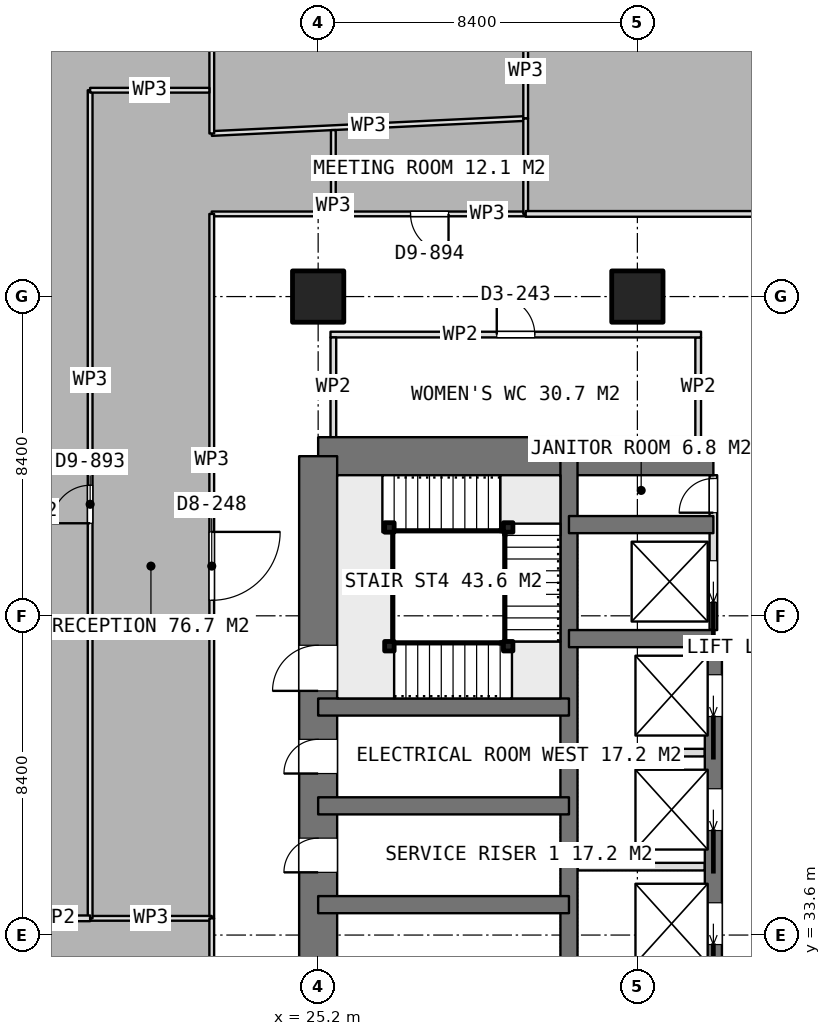
"""IFC4 building model, lengths in metres.
Left out: names, types, materials, properties, quantities, classifications, styles, units other than length and angle.
Written with IfcOpenShell. Run it as: python <this file> out.ifc"""

import sys

from ifc_helpers import new_model, si_unit, direction, frame, frame_2d, origin, origin_2d, place, context, subcontext, project, spatial, rectangle, extrude, element, fill, save


model = new_model("IFC4")
c1 = context("Model", 3, precision=1e-05, world=origin(), true_north=direction((0.0, 1.0)))
c2 = subcontext(c1, "Body", "Model", "MODEL_VIEW")
j1 = project(units=[si_unit("LENGTHUNIT", "METRE"), si_unit("PLANEANGLEUNIT", "RADIAN")], contexts=[c1])
p1 = place(None, origin())
s1 = spatial("IfcSite", under=j1, at=p1, CompositionType="ELEMENT")
p2 = place(p1, origin())
s2 = spatial("IfcBuilding", under=s1, at=p2, CompositionType="ELEMENT")
p3 = place(p2, frame((0.0, 0.0, 225.2)))
s3 = spatial("IfcBuildingStorey", under=s2, at=p3, CompositionType="ELEMENT", Elevation=225.2)
p4 = place(p3, frame((25.2, 46.2, 0.0), z_axis=(0.0, 0.0, 1.0), x_axis=(1.0, 0.0, 0.0)))
e1 = element("IfcWall", 1, at=p4, inside=s3, PredefinedType="SHEAR", context=c2, shape_type="SweptSolid", body=[
    extrude(rectangle(XDim=10.4, YDim=1.0, at=frame_2d((5.2, 0.0))), origin(), (0.0, 0.0, 1.0), 3.75),
])
p5 = place(p3, frame((25.2, 21.0, 0.0), z_axis=(0.0, 0.0, 1.0), x_axis=(0.0, 1.0, 0.0)))
e2 = element("IfcWall", 2, at=p5, inside=s3, PredefinedType="SHEAR", context=c2, shape_type="SweptSolid", body=[
    extrude(rectangle(XDim=25.2, YDim=1.0, at=frame_2d((12.6, 0.0))), origin(), (0.0, 0.0, 1.0), 3.75),
])
p6 = place(p5, frame((7.8, 0.0, 0.0)))
e3 = element("IfcOpeningElement", 3, at=p6, cuts=e2, PredefinedType="OPENING", context=c2, shape_type="SweptSolid", body=[
    extrude(rectangle(XDim=1.2, YDim=2.1, at=frame_2d((0.6, 1.05))), frame((0.0, 0.51, 0.0), z_axis=(0.0, -1.0, 0.0), x_axis=(1.0, 0.0, 0.0)), (0.0, 0.0, 1.0), 1.02),
])
p7 = place(p5, frame((14.25, 0.0, 0.0)))
e4 = element("IfcOpeningElement", 4, at=p7, cuts=e2, PredefinedType="OPENING", context=c2, shape_type="SweptSolid", body=[
    extrude(rectangle(XDim=0.9, YDim=2.1, at=frame_2d((0.45, 1.05))), frame((0.0, 0.51, 0.0), z_axis=(0.0, -1.0, 0.0), x_axis=(1.0, 0.0, 0.0)), (0.0, 0.0, 1.0), 1.02),
])
p8 = place(p5, frame((16.85, 0.0, 0.0)))
e5 = element("IfcOpeningElement", 5, at=p8, cuts=e2, PredefinedType="OPENING", context=c2, shape_type="SweptSolid", body=[
    extrude(rectangle(XDim=0.9, YDim=2.1, at=frame_2d((0.45, 1.05))), frame((0.0, 0.51, 0.0), z_axis=(0.0, -1.0, 0.0), x_axis=(1.0, 0.0, 0.0)), (0.0, 0.0, 1.0), 1.02),
])
p9 = place(p5, frame((19.025, 0.0, 0.0)))
e6 = element("IfcOpeningElement", 6, at=p9, cuts=e2, PredefinedType="OPENING", context=c2, shape_type="SweptSolid", body=[
    extrude(rectangle(XDim=1.2, YDim=2.1, at=frame_2d((0.6, 1.05))), frame((0.0, 0.51, 0.0), z_axis=(0.0, -1.0, 0.0), x_axis=(1.0, 0.0, 0.0)), (0.0, 0.0, 1.0), 1.02),
])
p10 = place(p3, frame((31.8, 21.0, 0.0), z_axis=(0.0, 0.0, 1.0), x_axis=(0.0, 1.0, 0.0)))
e7 = element("IfcWall", 7, at=p10, inside=s3, PredefinedType="SHEAR", context=c2, shape_type="SweptSolid", body=[
    extrude(rectangle(XDim=25.2, YDim=0.45, at=frame_2d((12.6, 0.0))), origin(), (0.0, 0.0, 1.0), 3.75),
])
p11 = place(p3, frame((35.6, 23.4, 0.0), z_axis=(0.0, 0.0, 1.0), x_axis=(0.0, 1.0, 0.0)))
e8 = element("IfcWall", 8, at=p11, inside=s3, PredefinedType="SHEAR", context=c2, shape_type="SweptSolid", body=[
    extrude(rectangle(XDim=18.0, YDim=0.45, at=frame_2d((9.0, 0.0))), origin(), (0.0, 0.0, 1.0), 3.75),
])
p12 = place(p11, frame((0.95, 0.0, 0.0)))
e9 = element("IfcOpeningElement", 9, at=p12, cuts=e8, PredefinedType="OPENING", context=c2, shape_type="SweptSolid", body=[
    extrude(rectangle(XDim=1.1, YDim=2.1, at=frame_2d((0.55, 1.05))), frame((0.0, 0.235, 0.0), z_axis=(0.0, -1.0, 0.0), x_axis=(1.0, 0.0, 0.0)), (0.0, 0.0, 1.0), 0.47),
])
p13 = place(p11, frame((3.95, 0.0, 0.0)))
e10 = element("IfcOpeningElement", 10, at=p13, cuts=e8, PredefinedType="OPENING", context=c2, shape_type="SweptSolid", body=[
    extrude(rectangle(XDim=1.1, YDim=2.1, at=frame_2d((0.55, 1.05))), frame((0.0, 0.235, 0.0), z_axis=(0.0, -1.0, 0.0), x_axis=(1.0, 0.0, 0.0)), (0.0, 0.0, 1.0), 0.47),
])
p14 = place(p11, frame((6.95, 0.0, 0.0)))
e11 = element("IfcOpeningElement", 11, at=p14, cuts=e8, PredefinedType="OPENING", context=c2, shape_type="SweptSolid", body=[
    extrude(rectangle(XDim=1.1, YDim=2.1, at=frame_2d((0.55, 1.05))), frame((0.0, 0.235, 0.0), z_axis=(0.0, -1.0, 0.0), x_axis=(1.0, 0.0, 0.0)), (0.0, 0.0, 1.0), 0.47),
])
p15 = place(p11, frame((9.95, 0.0, 0.0)))
e12 = element("IfcOpeningElement", 12, at=p15, cuts=e8, PredefinedType="OPENING", context=c2, shape_type="SweptSolid", body=[
    extrude(rectangle(XDim=1.1, YDim=2.1, at=frame_2d((0.55, 1.05))), frame((0.0, 0.235, 0.0), z_axis=(0.0, -1.0, 0.0), x_axis=(1.0, 0.0, 0.0)), (0.0, 0.0, 1.0), 0.47),
])
p16 = place(p11, frame((12.95, 0.0, 0.0)))
e13 = element("IfcOpeningElement", 13, at=p16, cuts=e8, PredefinedType="OPENING", context=c2, shape_type="SweptSolid", body=[
    extrude(rectangle(XDim=1.1, YDim=2.1, at=frame_2d((0.55, 1.05))), frame((0.0, 0.235, 0.0), z_axis=(0.0, -1.0, 0.0), x_axis=(1.0, 0.0, 0.0)), (0.0, 0.0, 1.0), 0.47),
])
p17 = place(p11, frame((15.95, 0.0, 0.0)))
e14 = element("IfcOpeningElement", 14, at=p17, cuts=e8, PredefinedType="OPENING", context=c2, shape_type="SweptSolid", body=[
    extrude(rectangle(XDim=1.1, YDim=2.1, at=frame_2d((0.55, 1.05))), frame((0.0, 0.235, 0.0), z_axis=(0.0, -1.0, 0.0), x_axis=(1.0, 0.0, 0.0)), (0.0, 0.0, 1.0), 0.47),
])
for number, where, z_axis, x_axis in (
    (15, (31.8, 41.4, 0.0), (0.0, 0.0, 1.0), (1.0, 0.0, 0.0)),
    (16, (31.8, 44.4, 0.0), (0.0, 0.0, 1.0), (1.0, 0.0, 0.0)),
):
    element("IfcWall", number, at=place(p3, frame(where, z_axis=z_axis, x_axis=x_axis)), inside=s3, PredefinedType="SHEAR", context=c2, shape_type="SweptSolid", body=[
        extrude(rectangle(XDim=3.8, YDim=0.45, at=frame_2d((1.9, 0.0))), origin(), (0.0, 0.0, 1.0), 3.75),
    ])
for number, where, z_axis, x_axis in (
    (17, (25.2, 34.4, 0.0), (0.0, 0.0, 1.0), (1.0, 0.0, 0.0)),
    (18, (25.2, 37.0, 0.0), (0.0, 0.0, 1.0), (1.0, 0.0, 0.0)),
    (19, (25.2, 39.6, 0.0), (0.0, 0.0, 1.0), (1.0, 0.0, 0.0)),
):
    element("IfcWall", number, at=place(p3, frame(where, z_axis=z_axis, x_axis=x_axis)), inside=s3, PredefinedType="SHEAR", context=c2, shape_type="SweptSolid", body=[
        extrude(rectangle(XDim=6.6, YDim=0.45, at=frame_2d((3.3, 0.0))), origin(), (0.0, 0.0, 1.0), 3.75),
    ])
for number, where, z_axis, x_axis in (
    (20, (25.2, 50.4, 0.0), (0.0, 0.0, 1.0), (1.0, 0.0, 0.0)),
    (21, (33.6, 50.4, 0.0), (0.0, 0.0, 1.0), (1.0, 0.0, 0.0)),
):
    element("IfcColumn", number, at=place(p3, frame(where, z_axis=z_axis, x_axis=x_axis)), inside=s3, PredefinedType="COLUMN", context=c2, shape_type="SweptSolid", body=[
        extrude(rectangle(XDim=1.35, YDim=1.35, at=origin_2d()), origin(), (0.0, 0.0, 1.0), 3.75),
    ])
for number, where, z_axis, x_axis in (
    (22, (32.025, 35.4, 0.0), (0.0, 0.0, 1.0), (1.0, 0.0, 0.0)),
    (23, (32.025, 38.4, 0.0), (0.0, 0.0, 1.0), (1.0, 0.0, 0.0)),
):
    element("IfcWall", number, at=place(p3, frame(where, z_axis=z_axis, x_axis=x_axis)), inside=s3, PredefinedType="PARTITIONING", context=c2, shape_type="SweptSolid", body=[
        extrude(rectangle(XDim=3.35, YDim=0.2, at=frame_2d((1.675, 0.0))), origin(), (0.0, 0.0, 1.0), 3.5),
    ])
p18 = place(p3, frame((35.6, 41.625, 0.0), z_axis=(0.0, 0.0, 1.0), x_axis=(0.0, 1.0, 0.0)))
e24 = element("IfcWall", 24, at=p18, inside=s3, PredefinedType="PARTITIONING", context=c2, shape_type="SweptSolid", body=[
    extrude(rectangle(XDim=4.075, YDim=0.2, at=frame_2d((2.038, 0.0))), origin(), (0.0, 0.0, 1.0), 3.5),
])
p19 = place(p18, frame((3.088, 0.0, 0.0)))
e25 = element("IfcOpeningElement", 25, at=p19, cuts=e24, PredefinedType="OPENING", context=c2, shape_type="SweptSolid", body=[
    extrude(rectangle(XDim=0.9, YDim=2.1, at=frame_2d((0.45, 1.05))), frame((0.0, 0.11, 0.0), z_axis=(0.0, -1.0, 0.0), x_axis=(1.0, 0.0, 0.0)), (0.0, 0.0, 1.0), 0.22),
])
p20 = place(p18, frame((0.725, 0.0, 0.0)))
e26 = element("IfcOpeningElement", 26, at=p20, cuts=e24, PredefinedType="OPENING", context=c2, shape_type="SweptSolid", body=[
    extrude(rectangle(XDim=1.1, YDim=2.1, at=frame_2d((0.55, 1.05))), frame((0.0, 0.11, 0.0), z_axis=(0.0, -1.0, 0.0), x_axis=(1.0, 0.0, 0.0)), (0.0, 0.0, 1.0), 0.22),
])
p21 = place(p3, frame((25.525, 49.4, 0.0), z_axis=(0.0, 0.0, 1.0), x_axis=(1.0, 0.0, 0.0)))
e27 = element("IfcWall", 27, at=p21, inside=s3, PredefinedType="PARTITIONING", context=c2, shape_type="SweptSolid", body=[
    extrude(rectangle(XDim=9.75, YDim=0.15, at=frame_2d((4.875, 0.0))), origin(), (0.0, 0.0, 1.0), 3.5),
])
p22 = place(p21, frame((4.375, 0.0, 0.0)))
e28 = element("IfcOpeningElement", 28, at=p22, cuts=e27, PredefinedType="OPENING", context=c2, shape_type="SweptSolid", body=[
    extrude(rectangle(XDim=1.0, YDim=2.1, at=frame_2d((0.5, 1.05))), frame((0.0, 0.085, 0.0), z_axis=(0.0, -1.0, 0.0), x_axis=(1.0, 0.0, 0.0)), (0.0, 0.0, 1.0), 0.17),
])
for number, where, z_axis, x_axis in (
    (29, (25.6, 46.7, 0.0), (0.0, 0.0, 1.0), (0.0, 1.0, 0.0)),
    (30, (35.2, 46.7, 0.0), (0.0, 0.0, 1.0), (0.0, 1.0, 0.0)),
):
    element("IfcWall", number, at=place(p3, frame(where, z_axis=z_axis, x_axis=x_axis)), inside=s3, PredefinedType="PARTITIONING", context=c2, shape_type="SweptSolid", body=[
        extrude(rectangle(XDim=2.625, YDim=0.15, at=frame_2d((1.312, 0.0))), origin(), (0.0, 0.0, 1.0), 3.5),
    ])
p23 = place(p3, frame((30.661, 55.086, 0.0), z_axis=(0.0, 0.0, 1.0), x_axis=(-0.998858431805, -0.047768537897, 0.0)))
e31 = element("IfcWall", 31, at=p23, inside=s3, PredefinedType="PARTITIONING", context=c2, shape_type="SweptSolid", body=[
    extrude(rectangle(XDim=8.27, YDim=0.125, at=frame_2d((4.135, 0.0))), origin(), (0.0, 0.0, 1.0), 3.5),
])
p24 = place(p3, frame((22.401, 54.691, 0.0), z_axis=(0.0, 0.0, 1.0), x_axis=(0.0, 1.0, 0.0)))
e32 = element("IfcWall", 32, at=p24, inside=s3, PredefinedType="PARTITIONING", context=c2, shape_type="SweptSolid", body=[
    extrude(rectangle(XDim=6.257, YDim=0.125, at=frame_2d((3.128, 0.0))), origin(), (0.0, 0.0, 1.0), 3.5),
])
p25 = place(p3, frame((30.661, 61.313, 0.0), z_axis=(0.0, 0.0, 1.0), x_axis=(0.0, -1.0, 0.0)))
e33 = element("IfcWall", 33, at=p25, inside=s3, PredefinedType="PARTITIONING", context=c2, shape_type="SweptSolid", body=[
    extrude(rectangle(XDim=6.227, YDim=0.125, at=frame_2d((3.114, 0.0))), origin(), (0.0, 0.0, 1.0), 3.5),
])
p26 = place(p25, frame((2.614, 0.0, 0.0)))
e34 = element("IfcOpeningElement", 34, at=p26, cuts=e33, PredefinedType="OPENING", context=c2, shape_type="SweptSolid", body=[
    extrude(rectangle(XDim=1.0, YDim=2.1, at=frame_2d((0.5, 1.05))), frame((0.0, 0.073, 0.0), z_axis=(0.0, -1.0, 0.0), x_axis=(1.0, 0.0, 0.0)), (0.0, 0.0, 1.0), 0.145),
])
p27 = place(p3, frame((25.6, 54.781, 0.0), z_axis=(0.0, 0.0, 1.0), x_axis=(0.0, -1.0, 0.0)))
e35 = element("IfcWall", 35, at=p27, inside=s3, PredefinedType="PARTITIONING", context=c2, shape_type="SweptSolid", body=[
    extrude(rectangle(XDim=2.206, YDim=0.125, at=frame_2d((1.103, 0.0))), origin(), (0.0, 0.0, 1.0), 3.5),
])
p28 = place(p3, frame((25.6, 52.575, 0.0), z_axis=(0.0, 0.0, 1.0), x_axis=(-1.0, 0.0, 0.0)))
e36 = element("IfcWall", 36, at=p28, inside=s3, PredefinedType="PARTITIONING", context=c2, shape_type="SweptSolid", body=[
    extrude(rectangle(XDim=3.2, YDim=0.125, at=frame_2d((1.6, 0.0))), origin(), (0.0, 0.0, 1.0), 3.5),
])
p29 = place(p3, frame((22.4, 52.575, 0.0), z_axis=(0.0, 0.0, 1.0), x_axis=(0.0, -1.0, 0.0)))
e37 = element("IfcWall", 37, at=p29, inside=s3, PredefinedType="PARTITIONING", context=c2, shape_type="SweptSolid", body=[
    extrude(rectangle(XDim=18.535, YDim=0.125, at=frame_2d((9.268, 0.0))), origin(), (0.0, 0.0, 1.0), 3.5),
])
p30 = place(p29, frame((8.367, 0.0, 0.0)))
e38 = element("IfcOpeningElement", 38, at=p30, cuts=e37, PredefinedType="OPENING", context=c2, shape_type="SweptSolid", body=[
    extrude(rectangle(XDim=1.8, YDim=2.1, at=frame_2d((0.9, 1.05))), frame((0.0, 0.073, 0.0), z_axis=(0.0, -1.0, 0.0), x_axis=(1.0, 0.0, 0.0)), (0.0, 0.0, 1.0), 0.145),
])
p31 = place(p3, frame((22.4, 34.04, 0.0), z_axis=(0.0, 0.0, 1.0), x_axis=(-1.0, 0.0, 0.0)))
e39 = element("IfcWall", 39, at=p31, inside=s3, PredefinedType="PARTITIONING", context=c2, shape_type="SweptSolid", body=[
    extrude(rectangle(XDim=3.2, YDim=0.125, at=frame_2d((1.6, 0.0))), origin(), (0.0, 0.0, 1.0), 3.5),
])
p32 = place(p3, frame((19.2, 34.04, 0.0), z_axis=(0.0, 0.0, 1.0), x_axis=(0.0, 1.0, 0.0)))
e40 = element("IfcWall", 40, at=p32, inside=s3, PredefinedType="PARTITIONING", context=c2, shape_type="SweptSolid", body=[
    extrude(rectangle(XDim=21.789, YDim=0.125, at=frame_2d((10.895, 0.0))), origin(), (0.0, 0.0, 1.0), 3.5),
])
p33 = place(p32, frame((10.395, 0.0, 0.0)))
e41 = element("IfcOpeningElement", 41, at=p33, cuts=e40, PredefinedType="OPENING", context=c2, shape_type="SweptSolid", body=[
    extrude(rectangle(XDim=1.0, YDim=2.1, at=frame_2d((0.5, 1.05))), frame((0.0, 0.073, 0.0), z_axis=(0.0, -1.0, 0.0), x_axis=(1.0, 0.0, 0.0)), (0.0, 0.0, 1.0), 0.145),
])
p34 = place(p3, frame((19.2, 55.829, 0.0), z_axis=(0.0, 0.0, 1.0), x_axis=(1.0, 0.0, 0.0)))
e42 = element("IfcWall", 42, at=p34, inside=s3, PredefinedType="PARTITIONING", context=c2, shape_type="SweptSolid", body=[
    extrude(rectangle(XDim=3.138, YDim=0.125, at=frame_2d((1.569, 0.0))), origin(), (0.0, 0.0, 1.0), 3.5),
])
p35 = place(p3, frame((30.661, 52.575, 0.0), z_axis=(0.0, 0.0, 1.0), x_axis=(-1.0, 0.0, 0.0)))
e43 = element("IfcWall", 43, at=p35, inside=s3, PredefinedType="PARTITIONING", context=c2, shape_type="SweptSolid", body=[
    extrude(rectangle(XDim=5.061, YDim=0.125, at=frame_2d((2.53, 0.0))), origin(), (0.0, 0.0, 1.0), 3.5),
])
p36 = place(p35, frame((2.03, 0.0, 0.0)))
e44 = element("IfcOpeningElement", 44, at=p36, cuts=e43, PredefinedType="OPENING", context=c2, shape_type="SweptSolid", body=[
    extrude(rectangle(XDim=1.0, YDim=2.1, at=frame_2d((0.5, 1.05))), frame((0.0, 0.073, 0.0), z_axis=(0.0, -1.0, 0.0), x_axis=(1.0, 0.0, 0.0)), (0.0, 0.0, 1.0), 0.145),
])
p37 = place(p3, frame((30.661, 55.086, 0.0), z_axis=(0.0, 0.0, 1.0), x_axis=(0.0, -1.0, 0.0)))
e45 = element("IfcWall", 45, at=p37, inside=s3, PredefinedType="PARTITIONING", context=c2, shape_type="SweptSolid", body=[
    extrude(rectangle(XDim=2.511, YDim=0.125, at=frame_2d((1.255, 0.0))), origin(), (0.0, 0.0, 1.0), 3.5),
])
p38 = place(p3, frame((53.2, 52.575, 0.0), z_axis=(0.0, 0.0, 1.0), x_axis=(-1.0, 0.0, 0.0)))
e46 = element("IfcWall", 46, at=p38, inside=s3, PredefinedType="PARTITIONING", context=c2, shape_type="SweptSolid", body=[
    extrude(rectangle(XDim=22.539, YDim=0.15, at=frame_2d((11.27, 0.0))), origin(), (0.0, 0.0, 1.0), 3.5),
])
p39 = place(p3, frame((19.2, 34.04, 0.0), z_axis=(0.0, 0.0, 1.0), x_axis=(-1.0, 0.0, 0.0)))
e47 = element("IfcWall", 47, at=p39, inside=s3, PredefinedType="PARTITIONING", context=c2, shape_type="SweptSolid", body=[
    extrude(rectangle(XDim=1.705, YDim=0.15, at=frame_2d((0.853, 0.0))), origin(), (0.0, 0.0, 1.0), 3.5),
])
p40 = place(p3, frame((22.4, 34.04, 0.0), z_axis=(0.0, 0.0, 1.0), x_axis=(0.0, -1.0, 0.0)))
e48 = element("IfcWall", 48, at=p40, inside=s3, PredefinedType="PARTITIONING", context=c2, shape_type="SweptSolid", body=[
    extrude(rectangle(XDim=5.965, YDim=0.125, at=frame_2d((2.982, 0.0))), origin(), (0.0, 0.0, 1.0), 3.5),
])
p41 = place(p40, frame((2.12, 0.0, 0.0)))
e49 = element("IfcOpeningElement", 49, at=p41, cuts=e48, PredefinedType="OPENING", context=c2, shape_type="SweptSolid", body=[
    extrude(rectangle(XDim=1.8, YDim=2.1, at=frame_2d((0.9, 1.05))), frame((0.0, 0.073, 0.0), z_axis=(0.0, -1.0, 0.0), x_axis=(1.0, 0.0, 0.0)), (0.0, 0.0, 1.0), 0.145),
])
for number, where, z_axis, x_axis in (
    (50, (27.075, 41.2, 0.0), (0.0, 0.0, 1.0), (1.0, 0.0, 0.0)),
    (51, (30.2, 41.2, 0.0), (0.0, 0.0, 1.0), (1.0, 0.0, 0.0)),
    (52, (30.2, 44.325, 0.0), (0.0, 0.0, 1.0), (1.0, 0.0, 0.0)),
    (53, (27.075, 44.325, 0.0), (0.0, 0.0, 1.0), (1.0, 0.0, 0.0)),
):
    element("IfcColumn", number, at=place(p3, frame(where, z_axis=z_axis, x_axis=x_axis)), inside=s3, PredefinedType="COLUMN", context=c2, shape_type="SweptSolid", body=[
        extrude(rectangle(XDim=0.25, YDim=0.25, at=origin_2d()), origin(), (0.0, 0.0, 1.0), 3.75),
    ])
p42 = place(p7, origin())
e54 = element("IfcDoor", 54, at=p42, inside=s3, OperationType="SINGLE_SWING_LEFT", PredefinedType="DOOR", context=c2, shape_type="SweptSolid", body=[
    extrude(rectangle(XDim=0.9, YDim=2.1, at=frame_2d((0.45, 1.05))), frame((0.0, 0.025, 0.0), z_axis=(0.0, -1.0, 0.0), x_axis=(1.0, 0.0, 0.0)), (0.0, 0.0, 1.0), 0.05),
])
fill(e4, e54)
p43 = place(p8, origin())
e55 = element("IfcDoor", 55, at=p43, inside=s3, OperationType="SINGLE_SWING_LEFT", PredefinedType="DOOR", context=c2, shape_type="SweptSolid", body=[
    extrude(rectangle(XDim=0.9, YDim=2.1, at=frame_2d((0.45, 1.05))), frame((0.0, 0.025, 0.0), z_axis=(0.0, -1.0, 0.0), x_axis=(1.0, 0.0, 0.0)), (0.0, 0.0, 1.0), 0.05),
])
fill(e5, e55)
p44 = place(p19, origin())
e56 = element("IfcDoor", 56, at=p44, inside=s3, OperationType="SINGLE_SWING_LEFT", PredefinedType="DOOR", context=c2, shape_type="SweptSolid", body=[
    extrude(rectangle(XDim=0.9, YDim=2.1, at=frame_2d((0.45, 1.05))), frame((0.0, 0.025, 0.0), z_axis=(0.0, -1.0, 0.0), x_axis=(1.0, 0.0, 0.0)), (0.0, 0.0, 1.0), 0.05),
])
fill(e25, e56)
p45 = place(p15, origin())
e57 = element("IfcDoor", 57, at=p45, inside=s3, OperationType="SLIDING_TO_LEFT", PredefinedType="USERDEFINED", context=c2, shape_type="SweptSolid", body=[
    extrude(rectangle(XDim=1.1, YDim=2.1, at=frame_2d((0.55, 1.05))), frame((0.0, 0.025, 0.0), z_axis=(0.0, -1.0, 0.0), x_axis=(1.0, 0.0, 0.0)), (0.0, 0.0, 1.0), 0.05),
])
fill(e12, e57)
p46 = place(p16, origin())
e58 = element("IfcDoor", 58, at=p46, inside=s3, OperationType="SLIDING_TO_LEFT", PredefinedType="USERDEFINED", context=c2, shape_type="SweptSolid", body=[
    extrude(rectangle(XDim=1.1, YDim=2.1, at=frame_2d((0.55, 1.05))), frame((0.0, 0.025, 0.0), z_axis=(0.0, -1.0, 0.0), x_axis=(1.0, 0.0, 0.0)), (0.0, 0.0, 1.0), 0.05),
])
fill(e13, e58)
p47 = place(p17, origin())
e59 = element("IfcDoor", 59, at=p47, inside=s3, OperationType="SLIDING_TO_LEFT", PredefinedType="USERDEFINED", context=c2, shape_type="SweptSolid", body=[
    extrude(rectangle(XDim=1.1, YDim=2.1, at=frame_2d((0.55, 1.05))), frame((0.0, 0.025, 0.0), z_axis=(0.0, -1.0, 0.0), x_axis=(1.0, 0.0, 0.0)), (0.0, 0.0, 1.0), 0.05),
])
fill(e14, e59)
p48 = place(p20, origin())
e60 = element("IfcDoor", 60, at=p48, inside=s3, OperationType="SLIDING_TO_LEFT", PredefinedType="USERDEFINED", context=c2, shape_type="SweptSolid", body=[
    extrude(rectangle(XDim=1.1, YDim=2.1, at=frame_2d((0.55, 1.05))), frame((0.0, 0.025, 0.0), z_axis=(0.0, -1.0, 0.0), x_axis=(1.0, 0.0, 0.0)), (0.0, 0.0, 1.0), 0.05),
])
fill(e26, e60)
p49 = place(p22, origin())
e61 = element("IfcDoor", 61, at=p49, inside=s3, OperationType="SINGLE_SWING_LEFT", PredefinedType="DOOR", context=c2, shape_type="SweptSolid", body=[
    extrude(rectangle(XDim=1.0, YDim=2.1, at=frame_2d((0.5, 1.05))), frame((0.0, 0.025, 0.0), z_axis=(0.0, -1.0, 0.0), x_axis=(1.0, 0.0, 0.0)), (0.0, 0.0, 1.0), 0.05),
])
fill(e28, e61)
p50 = place(p30, origin())
e62 = element("IfcDoor", 62, at=p50, inside=s3, OperationType="DOUBLE_DOOR_SINGLE_SWING", PredefinedType="DOOR", context=c2, shape_type="SweptSolid", body=[
    extrude(rectangle(XDim=1.8, YDim=2.1, at=frame_2d((0.9, 1.05))), frame((0.0, 0.025, 0.0), z_axis=(0.0, -1.0, 0.0), x_axis=(1.0, 0.0, 0.0)), (0.0, 0.0, 1.0), 0.05),
])
fill(e38, e62)
p51 = place(p36, origin())
e63 = element("IfcDoor", 63, at=p51, inside=s3, OperationType="SINGLE_SWING_LEFT", PredefinedType="DOOR", context=c2, shape_type="SweptSolid", body=[
    extrude(rectangle(XDim=1.0, YDim=2.1, at=frame_2d((0.5, 1.05))), frame((0.0, 0.025, 0.0), z_axis=(0.0, -1.0, 0.0), x_axis=(1.0, 0.0, 0.0)), (0.0, 0.0, 1.0), 0.05),
])
fill(e44, e63)
p52 = place(p33, origin())
e64 = element("IfcDoor", 64, at=p52, inside=s3, OperationType="SINGLE_SWING_LEFT", PredefinedType="DOOR", context=c2, shape_type="SweptSolid", body=[
    extrude(rectangle(XDim=1.0, YDim=2.1, at=frame_2d((0.5, 1.05))), frame((0.0, 0.025, 0.0), z_axis=(0.0, -1.0, 0.0), x_axis=(1.0, 0.0, 0.0)), (0.0, 0.0, 1.0), 0.05),
])
fill(e41, e64)
p53 = place(p9, origin())
e65 = element("IfcDoor", 65, at=p53, inside=s3, OperationType="SINGLE_SWING_RIGHT", PredefinedType="DOOR", context=c2, shape_type="SweptSolid", body=[
    extrude(rectangle(XDim=1.2, YDim=2.1, at=frame_2d((0.6, 1.05))), frame((0.0, 0.025, 0.0), z_axis=(0.0, -1.0, 0.0), x_axis=(1.0, 0.0, 0.0)), (0.0, 0.0, 1.0), 0.05),
])
fill(e6, e65)
save(model, sys.argv[1])
